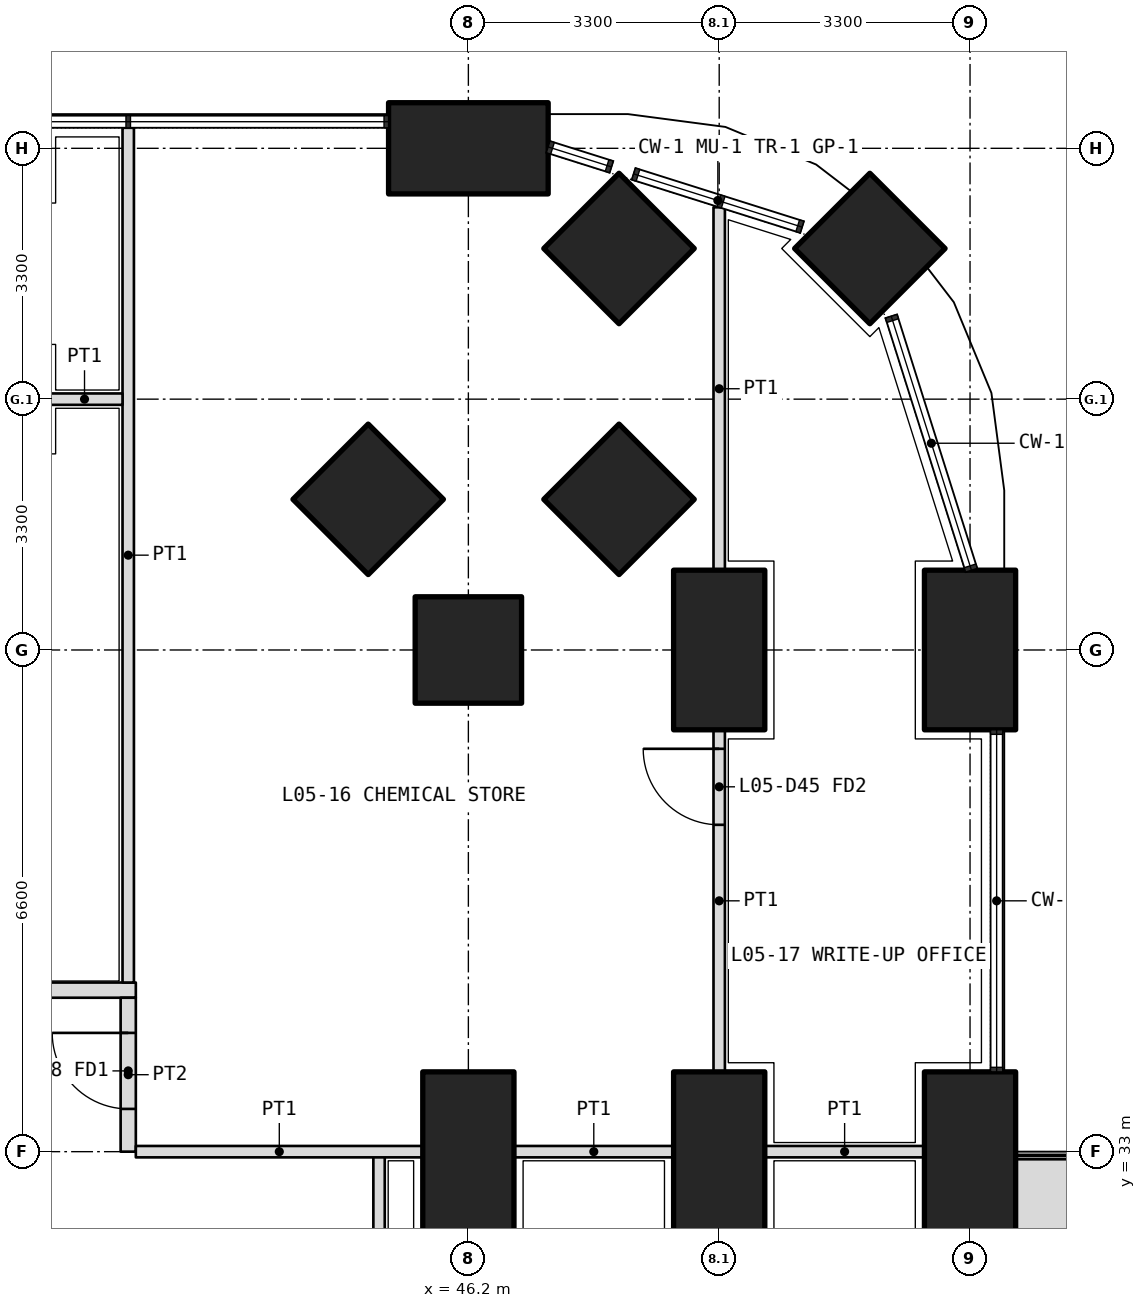
"""IFC4 building model, lengths in metres.
Left out: names, types, materials, properties, quantities, classifications, styles, units other than length and angle.
Written with IfcOpenShell. Run it as: python <this file> out.ifc"""

import sys

from ifc_helpers import new_model, si_unit, direction, frame, frame_2d, origin, origin_2d, place, context, subcontext, project, spatial, polyline, rectangle, outline, extrude, element, fill, save


model = new_model("IFC4")
c1 = context("Model", 3, precision=1e-05, world=origin(), true_north=direction((0.0, 1.0)))
c2 = subcontext(c1, "Body", "Model", "MODEL_VIEW")
j1 = project(units=[si_unit("LENGTHUNIT", "METRE"), si_unit("PLANEANGLEUNIT", "RADIAN")], contexts=[c1])
p1 = place(None, origin())
s1 = spatial("IfcSite", under=j1, at=p1, CompositionType="ELEMENT")
p2 = place(p1, origin())
s2 = spatial("IfcBuilding", under=s1, at=p2, CompositionType="ELEMENT")
p3 = place(p2, frame((0.0, 0.0, 25.5)))
s3 = spatial("IfcBuildingStorey", under=s2, at=p3, CompositionType="ELEMENT", Elevation=25.5)
p4 = place(p3, frame((51.482, 44.882, 0.0), z_axis=(0.0, 0.0, 1.0), x_axis=(0.707106781187, 0.707106781187, 0.0)))
e1 = element("IfcColumn", 1, at=p4, inside=s3, PredefinedType="COLUMN", context=c2, shape_type="SweptSolid", body=[
    extrude(rectangle(XDim=1.4, YDim=1.4, at=origin_2d()), origin(), (0.0, 0.0, 1.0), 4.2),
])
for number, where, z_axis, x_axis in (
    (2, (52.8, 33.0, 0.0), (0.0, 0.0, 1.0), (0.0, 1.0, 0.0)),
    (3, (52.8, 39.6, 0.0), (0.0, 0.0, 1.0), (0.0, 1.0, 0.0)),
    (4, (46.2, 46.2, 0.0), (0.0, 0.0, 1.0), (1.0, 0.0, 0.0)),
):
    element("IfcColumn", number, at=place(p3, frame(where, z_axis=z_axis, x_axis=x_axis)), inside=s3, PredefinedType="COLUMN", context=c2, shape_type="SweptSolid", body=[
        extrude(rectangle(XDim=2.1, YDim=1.2, at=origin_2d()), origin(), (0.0, 0.0, 1.0), 4.2),
    ])
for number, where, z_axis, x_axis in (
    (5, (46.2, 39.6, 0.0), (0.0, 0.0, 1.0), (1.0, 0.0, 0.0)),
    (6, (48.182, 44.882, 0.0), (0.0, 0.0, 1.0), (0.707, 0.707, 0.0)),
):
    element("IfcColumn", number, at=place(p3, frame(where, z_axis=z_axis, x_axis=x_axis)), inside=s3, PredefinedType="COLUMN", context=c2, shape_type="SweptSolid", body=[
        extrude(rectangle(XDim=1.4, YDim=1.4, at=origin_2d()), origin(), (0.0, 0.0, 1.0), 4.2),
    ])
for number, where, z_axis, x_axis in (
    (7, (49.5, 33.0, 0.0), (0.0, 0.0, 1.0), (0.0, 1.0, 0.0)),
    (8, (49.5, 39.6, 0.0), (0.0, 0.0, 1.0), (0.0, 1.0, 0.0)),
):
    element("IfcColumn", number, at=place(p3, frame(where, z_axis=z_axis, x_axis=x_axis)), inside=s3, PredefinedType="COLUMN", context=c2, shape_type="SweptSolid", body=[
        extrude(rectangle(XDim=2.1, YDim=1.2, at=origin_2d()), origin(), (0.0, 0.0, 1.0), 4.2),
    ])
for number, where, z_axis, x_axis in (
    (9, (48.182, 41.582, 0.0), (0.0, 0.0, 1.0), (0.707, 0.707, 0.0)),
    (10, (44.882, 41.582, 0.0), (0.0, 0.0, 1.0), (0.707, 0.707, 0.0)),
):
    element("IfcColumn", number, at=place(p3, frame(where, z_axis=z_axis, x_axis=x_axis)), inside=s3, PredefinedType="COLUMN", context=c2, shape_type="SweptSolid", body=[
        extrude(rectangle(XDim=1.4, YDim=1.4, at=origin_2d()), origin(), (0.0, 0.0, 1.0), 4.2),
    ])
p5 = place(p3, frame((46.2, 33.0, 0.0), z_axis=(0.0, 0.0, 1.0), x_axis=(0.0, 1.0, 0.0)))
e11 = element("IfcColumn", 11, at=p5, inside=s3, PredefinedType="COLUMN", context=c2, shape_type="SweptSolid", body=[
    extrude(rectangle(XDim=2.1, YDim=1.2, at=origin_2d()), origin(), (0.0, 0.0, 1.0), 4.2),
])
p6 = place(p3, origin())
e12 = element("IfcWall", 12, at=p6, inside=s3, PredefinedType="USERDEFINED", context=c2, shape_type="SweptSolid", body=[
    extrude(outline(polyline([(53.35, 23.85), (54.35, 23.85), (54.35, 32.9), (53.35, 32.9), (53.35, 23.85)]), holes=[polyline([(53.5, 24.0), (54.2, 24.0), (54.2, 32.75), (53.5, 32.75), (53.5, 24.0)])]), origin(), (0.0, 0.0, 1.0), 1.05),
])
p7 = place(p3, frame((10.975, 35.125, 0.0), z_axis=(0.0, 0.0, 1.0), x_axis=(1.0, 0.0, 0.0)))
e13 = element("IfcWall", 13, at=p7, inside=s3, PredefinedType="PARTITIONING", context=c2, shape_type="SweptSolid", body=[
    extrude(rectangle(XDim=30.85, YDim=0.2, at=frame_2d((15.425, 0.0))), origin(), (0.0, 0.0, 1.0), 2.85),
])
p8 = place(p7, frame((0.663, 0.0, 0.0)))
e14 = element("IfcOpeningElement", 14, at=p8, cuts=e13, PredefinedType="OPENING", context=c2, shape_type="SweptSolid", body=[
    extrude(rectangle(XDim=1.0, YDim=2.1, at=frame_2d((0.5, 1.05))), frame((0.0, 0.11, 0.0), z_axis=(0.0, -1.0, 0.0), x_axis=(1.0, 0.0, 0.0)), (0.0, 0.0, 1.0), 0.22),
])
p9 = place(p7, frame((4.925, 0.0, 0.0)))
e15 = element("IfcOpeningElement", 15, at=p9, cuts=e13, PredefinedType="OPENING", context=c2, shape_type="SweptSolid", body=[
    extrude(rectangle(XDim=1.2, YDim=2.1, at=frame_2d((0.6, 1.05))), frame((0.0, 0.11, 0.0), z_axis=(0.0, -1.0, 0.0), x_axis=(1.0, 0.0, 0.0)), (0.0, 0.0, 1.0), 0.22),
])
p10 = place(p7, frame((9.975, 0.0, 0.0)))
e16 = element("IfcOpeningElement", 16, at=p10, cuts=e13, PredefinedType="OPENING", context=c2, shape_type="SweptSolid", body=[
    extrude(rectangle(XDim=1.0, YDim=2.1, at=frame_2d((0.5, 1.05))), frame((0.0, 0.11, 0.0), z_axis=(0.0, -1.0, 0.0), x_axis=(1.0, 0.0, 0.0)), (0.0, 0.0, 1.0), 0.22),
])
p11 = place(p7, frame((13.725, 0.0, 0.0)))
e17 = element("IfcOpeningElement", 17, at=p11, cuts=e13, PredefinedType="OPENING", context=c2, shape_type="SweptSolid", body=[
    extrude(rectangle(XDim=1.0, YDim=2.1, at=frame_2d((0.5, 1.05))), frame((0.0, 0.11, 0.0), z_axis=(0.0, -1.0, 0.0), x_axis=(1.0, 0.0, 0.0)), (0.0, 0.0, 1.0), 0.22),
])
p12 = place(p7, frame((17.025, 0.0, 0.0)))
e18 = element("IfcOpeningElement", 18, at=p12, cuts=e13, PredefinedType="OPENING", context=c2, shape_type="SweptSolid", body=[
    extrude(rectangle(XDim=1.0, YDim=2.1, at=frame_2d((0.5, 1.05))), frame((0.0, 0.11, 0.0), z_axis=(0.0, -1.0, 0.0), x_axis=(1.0, 0.0, 0.0)), (0.0, 0.0, 1.0), 0.22),
])
p13 = place(p7, frame((24.137, 0.0, 0.0)))
e19 = element("IfcOpeningElement", 19, at=p13, cuts=e13, PredefinedType="OPENING", context=c2, shape_type="SweptSolid", body=[
    extrude(rectangle(XDim=1.2, YDim=2.1, at=frame_2d((0.6, 1.05))), frame((0.0, 0.11, 0.0), z_axis=(0.0, -1.0, 0.0), x_axis=(1.0, 0.0, 0.0)), (0.0, 0.0, 1.0), 0.22),
])
p14 = place(p3, frame((41.725, 33.0, 0.0), z_axis=(0.0, 0.0, 1.0), x_axis=(0.0, 1.0, 0.0)))
e20 = element("IfcWall", 20, at=p14, inside=s3, PredefinedType="PARTITIONING", context=c2, shape_type="SweptSolid", body=[
    extrude(rectangle(XDim=2.025, YDim=0.2, at=frame_2d((1.012, 0.0))), origin(), (0.0, 0.0, 1.0), 2.85),
])
p15 = place(p14, frame((0.562, 0.0, 0.0)))
e21 = element("IfcOpeningElement", 21, at=p15, cuts=e20, PredefinedType="OPENING", context=c2, shape_type="SweptSolid", body=[
    extrude(rectangle(XDim=1.0, YDim=2.1, at=frame_2d((0.5, 1.05))), frame((0.0, 0.11, 0.0), z_axis=(0.0, -1.0, 0.0), x_axis=(1.0, 0.0, 0.0)), (0.0, 0.0, 1.0), 0.22),
])
p16 = place(p3, frame((41.725, 46.47, 0.0), z_axis=(0.0, 0.0, 1.0), x_axis=(0.0, -1.0, 0.0)))
e22 = element("IfcWall", 22, at=p16, inside=s3, PredefinedType="PARTITIONING", context=c2, shape_type="SweptSolid", body=[
    extrude(rectangle(XDim=11.245, YDim=0.15, at=frame_2d((5.623, 0.0))), origin(), (0.0, 0.0, 1.0), 2.7),
])
p17 = place(p3, frame((49.5, 34.05, 0.0), z_axis=(0.0, 0.0, 1.0), x_axis=(0.0, 1.0, 0.0)))
e23 = element("IfcWall", 23, at=p17, inside=s3, PredefinedType="PARTITIONING", context=c2, shape_type="SweptSolid", body=[
    extrude(rectangle(XDim=4.5, YDim=0.15, at=frame_2d((2.25, 0.0))), origin(), (0.0, 0.0, 1.0), 3.9),
])
p18 = place(p17, frame((3.25, 0.0, 0.0)))
e24 = element("IfcOpeningElement", 24, at=p18, cuts=e23, PredefinedType="OPENING", context=c2, shape_type="SweptSolid", body=[
    extrude(rectangle(XDim=1.0, YDim=2.1, at=frame_2d((0.5, 1.05))), frame((0.0, 0.085, 0.0), z_axis=(0.0, -1.0, 0.0), x_axis=(1.0, 0.0, 0.0)), (0.0, 0.0, 1.0), 0.17),
])
p19 = place(p3, frame((49.5, 40.65, 0.0), z_axis=(0.0, 0.0, 1.0), x_axis=(0.0, 1.0, 0.0)))
e25 = element("IfcWall", 25, at=p19, inside=s3, PredefinedType="PARTITIONING", context=c2, shape_type="SweptSolid", body=[
    extrude(rectangle(XDim=4.774, YDim=0.15, at=frame_2d((2.387, 0.0))), origin(), (0.0, 0.0, 1.0), 2.7),
])
p20 = place(p3, frame((45.025, 29.7, 0.0), z_axis=(0.0, 0.0, 1.0), x_axis=(0.0, 1.0, 0.0)))
e26 = element("IfcWall", 26, at=p20, inside=s3, PredefinedType="PARTITIONING", context=c2, shape_type="SweptSolid", body=[
    extrude(rectangle(XDim=3.3, YDim=0.15, at=frame_2d((1.65, 0.0))), origin(), (0.0, 0.0, 1.0), 2.85),
])
p21 = place(p20, frame((0.9, 0.0, 0.0)))
e27 = element("IfcOpeningElement", 27, at=p21, cuts=e26, PredefinedType="OPENING", context=c2, shape_type="SweptSolid", body=[
    extrude(rectangle(XDim=1.2, YDim=2.1, at=frame_2d((0.6, 1.05))), frame((0.0, 0.085, 0.0), z_axis=(0.0, -1.0, 0.0), x_axis=(1.0, 0.0, 0.0)), (0.0, 0.0, 1.0), 0.17),
])
for number, where, z_axis, x_axis in (
    (28, (52.2, 33.0, 0.0), (0.0, 0.0, 1.0), (-1.0, 0.0, 0.0)),
    (29, (48.9, 33.0, 0.0), (0.0, 0.0, 1.0), (-1.0, 0.0, 0.0)),
):
    element("IfcWall", number, at=place(p3, frame(where, z_axis=z_axis, x_axis=x_axis)), inside=s3, PredefinedType="PARTITIONING", context=c2, shape_type="SweptSolid", body=[
        extrude(rectangle(XDim=2.1, YDim=0.15, at=frame_2d((1.05, 0.0))), origin(), (0.0, 0.0, 1.0), 2.85),
    ])
p22 = place(p3, frame((45.6, 33.0, 0.0), z_axis=(0.0, 0.0, 1.0), x_axis=(-1.0, 0.0, 0.0)))
e30 = element("IfcWall", 30, at=p22, inside=s3, PredefinedType="PARTITIONING", context=c2, shape_type="SweptSolid", body=[
    extrude(rectangle(XDim=3.775, YDim=0.15, at=frame_2d((1.888, 0.0))), origin(), (0.0, 0.0, 1.0), 2.85),
])
p23 = place(p3, frame((41.65, 42.9, 0.0), z_axis=(0.0, 0.0, 1.0), x_axis=(-1.0, 0.0, 0.0)))
e31 = element("IfcWall", 31, at=p23, inside=s3, PredefinedType="PARTITIONING", context=c2, shape_type="SweptSolid", body=[
    extrude(rectangle(XDim=1.0, YDim=0.15, at=frame_2d((0.5, 0.0))), origin(), (0.0, 0.0, 1.0), 3.9),
])
p24 = place(p15, origin())
e32 = element("IfcDoor", 32, at=p24, inside=s3, OperationType="SINGLE_SWING_RIGHT", PredefinedType="DOOR", context=c2, shape_type="SweptSolid", body=[
    extrude(rectangle(XDim=1.0, YDim=2.1, at=frame_2d((0.5, 1.05))), frame((0.0, 0.025, 0.0), z_axis=(0.0, -1.0, 0.0), x_axis=(1.0, 0.0, 0.0)), (0.0, 0.0, 1.0), 0.05),
])
fill(e21, e32)
p25 = place(p18, origin())
e33 = element("IfcDoor", 33, at=p25, inside=s3, OperationType="SINGLE_SWING_RIGHT", PredefinedType="DOOR", context=c2, shape_type="SweptSolid", body=[
    extrude(rectangle(XDim=1.0, YDim=2.1, at=frame_2d((0.5, 1.05))), frame((0.0, 0.025, 0.0), z_axis=(0.0, -1.0, 0.0), x_axis=(1.0, 0.0, 0.0)), (0.0, 0.0, 1.0), 0.05),
])
fill(e24, e33)
save(model, sys.argv[1])
